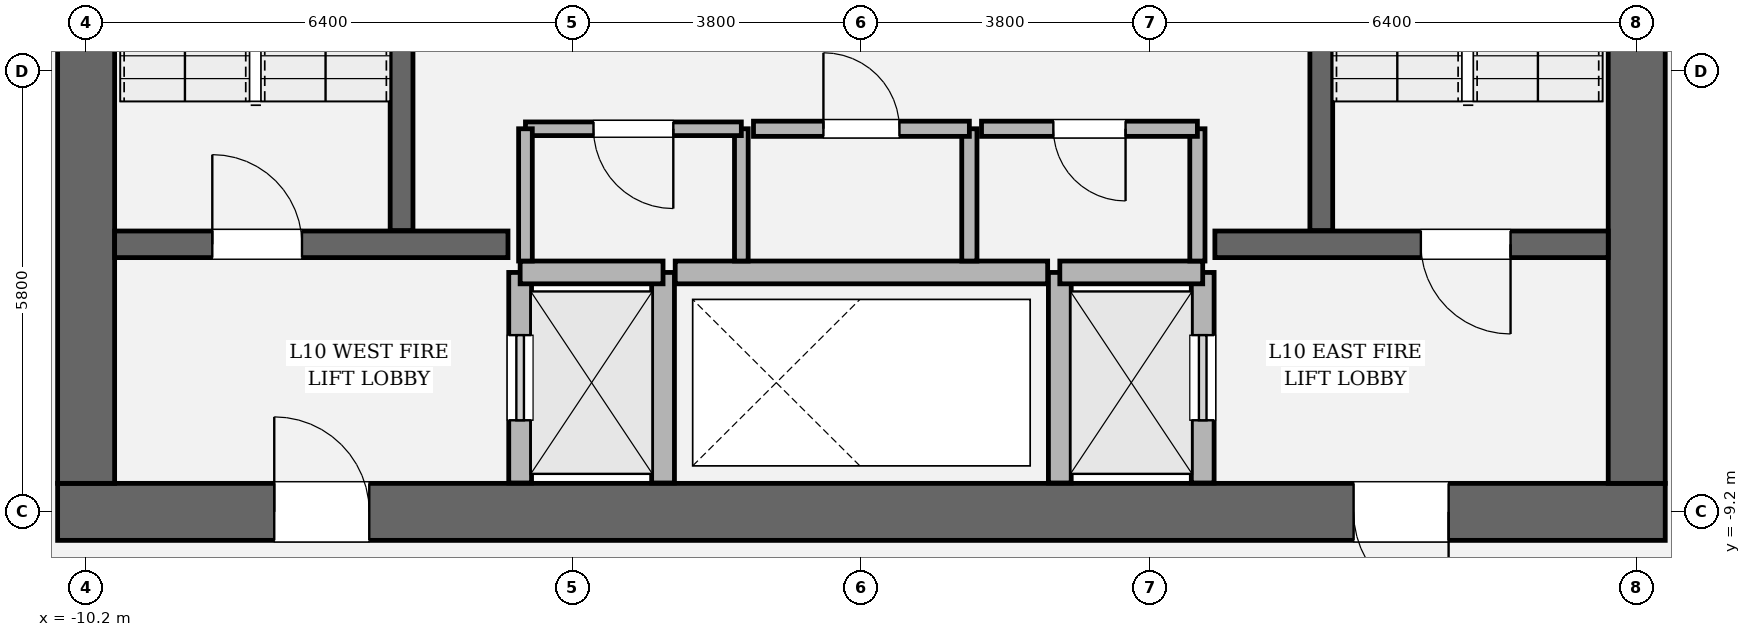
"""IFC4 building model, lengths in metres.
Left out: names, types, materials, properties, quantities, classifications, styles, units other than length and angle.
Written with IfcOpenShell. Run it as: python <this file> out.ifc"""

import sys

from ifc_helpers import new_model, si_unit, direction, frame, frame_2d, origin, place, context, subcontext, project, spatial, rectangle, extrude, element, fill, save


model = new_model("IFC4")
c1 = context("Model", 3, precision=1e-05, world=origin(), true_north=direction((0.0, 1.0)))
c2 = subcontext(c1, "Body", "Model", "MODEL_VIEW")
j1 = project(units=[si_unit("LENGTHUNIT", "METRE"), si_unit("PLANEANGLEUNIT", "RADIAN")], contexts=[c1])
p1 = place(None, origin())
s1 = spatial("IfcSite", under=j1, at=p1, CompositionType="ELEMENT")
p2 = place(p1, origin())
s2 = spatial("IfcBuilding", under=s1, at=p2, CompositionType="ELEMENT")
p3 = place(p2, frame((0.0, 0.0, 48.45)))
s3 = spatial("IfcBuildingStorey", under=s2, at=p3, CompositionType="ELEMENT", Elevation=48.45)
p4 = place(p3, frame((10.575, -9.2, 0.0), z_axis=(0.0, 0.0, 1.0), x_axis=(-1.0, 0.0, 0.0)))
e1 = element("IfcWall", 1, at=p4, inside=s3, PredefinedType="SHEAR", context=c2, shape_type="SweptSolid", body=[
    extrude(rectangle(XDim=21.15, YDim=0.75, at=frame_2d((10.575, 0.0))), origin(), (0.0, 0.0, 1.0), 4.05),
])
p5 = place(p4, frame((2.85, 0.0, 0.0)))
e2 = element("IfcOpeningElement", 2, at=p5, cuts=e1, PredefinedType="OPENING", context=c2, shape_type="SweptSolid", body=[
    extrude(rectangle(XDim=1.25, YDim=2.25, at=frame_2d((0.625, 1.125))), frame((0.0, 0.385, 0.0), z_axis=(0.0, -1.0, 0.0), x_axis=(1.0, 0.0, 0.0)), (0.0, 0.0, 1.0), 0.77),
])
p6 = place(p4, frame((17.05, 0.0, 0.0)))
e3 = element("IfcOpeningElement", 3, at=p6, cuts=e1, PredefinedType="OPENING", context=c2, shape_type="SweptSolid", body=[
    extrude(rectangle(XDim=1.25, YDim=2.25, at=frame_2d((0.625, 1.125))), frame((0.0, 0.385, 0.0), z_axis=(0.0, -1.0, 0.0), x_axis=(1.0, 0.0, 0.0)), (0.0, 0.0, 1.0), 0.77),
])
p7 = place(p3, frame((-10.2, -8.825, 0.0), z_axis=(0.0, 0.0, 1.0), x_axis=(0.0, 1.0, 0.0)))
e4 = element("IfcWall", 4, at=p7, inside=s3, PredefinedType="SHEAR", context=c2, shape_type="SweptSolid", body=[
    extrude(rectangle(XDim=17.65, YDim=0.75, at=frame_2d((8.825, 0.0))), origin(), (0.0, 0.0, 1.0), 4.05),
])
p8 = place(p7, frame((12.615, 0.0, 0.0)))
e5 = element("IfcOpeningElement", 5, at=p8, cuts=e4, PredefinedType="OPENING", context=c2, shape_type="SweptSolid", body=[
    extrude(rectangle(XDim=1.18, YDim=2.2, at=frame_2d((0.59, 1.1))), frame((0.0, 0.385, 0.0), z_axis=(0.0, -1.0, 0.0), x_axis=(1.0, 0.0, 0.0)), (0.0, 0.0, 1.0), 0.77),
])
p9 = place(p3, frame((10.2, 8.825, 0.0), z_axis=(0.0, 0.0, 1.0), x_axis=(0.0, -1.0, 0.0)))
e6 = element("IfcWall", 6, at=p9, inside=s3, PredefinedType="SHEAR", context=c2, shape_type="SweptSolid", body=[
    extrude(rectangle(XDim=17.65, YDim=0.75, at=frame_2d((8.825, 0.0))), origin(), (0.0, 0.0, 1.0), 4.05),
])
p10 = place(p9, frame((3.855, 0.0, 0.0)))
e7 = element("IfcOpeningElement", 7, at=p10, cuts=e6, PredefinedType="OPENING", context=c2, shape_type="SweptSolid", body=[
    extrude(rectangle(XDim=1.18, YDim=2.2, at=frame_2d((0.59, 1.1))), frame((0.0, 0.385, 0.0), z_axis=(0.0, -1.0, 0.0), x_axis=(1.0, 0.0, 0.0)), (0.0, 0.0, 1.0), 0.77),
])
for number, where, z_axis, x_axis in (
    (8, (-6.05, -5.5, 0.0), (0.0, 0.0, 1.0), (0.0, 1.0, 0.0)),
    (9, (6.05, 3.45, 0.0), (0.0, 0.0, 1.0), (0.0, -1.0, 0.0)),
):
    element("IfcWall", number, at=place(p3, frame(where, z_axis=z_axis, x_axis=x_axis)), inside=s3, PredefinedType="SOLIDWALL", context=c2, shape_type="SweptSolid", body=[
        extrude(rectangle(XDim=8.95, YDim=0.3, at=frame_2d((4.475, 0.0))), origin(), (0.0, 0.0, 1.0), 4.05),
    ])
p11 = place(p3, frame((-9.825, -5.68, 0.0), z_axis=(0.0, 0.0, 1.0), x_axis=(1.0, 0.0, 0.0)))
e10 = element("IfcWall", 10, at=p11, inside=s3, PredefinedType="SOLIDWALL", context=c2, shape_type="SweptSolid", body=[
    extrude(rectangle(XDim=5.175, YDim=0.35, at=frame_2d((2.587, 0.0))), origin(), (0.0, 0.0, 1.0), 4.05),
])
p12 = place(p11, frame((1.285, 0.0, 0.0)))
e11 = element("IfcOpeningElement", 11, at=p12, cuts=e10, PredefinedType="OPENING", context=c2, shape_type="SweptSolid", body=[
    extrude(rectangle(XDim=1.18, YDim=2.2, at=frame_2d((0.59, 1.1))), frame((0.0, 0.185, 0.0), z_axis=(0.0, -1.0, 0.0), x_axis=(1.0, 0.0, 0.0)), (0.0, 0.0, 1.0), 0.37),
])
p13 = place(p3, frame((4.65, -5.68, 0.0), z_axis=(0.0, 0.0, 1.0), x_axis=(1.0, 0.0, 0.0)))
e12 = element("IfcWall", 12, at=p13, inside=s3, PredefinedType="SOLIDWALL", context=c2, shape_type="SweptSolid", body=[
    extrude(rectangle(XDim=5.175, YDim=0.35, at=frame_2d((2.587, 0.0))), origin(), (0.0, 0.0, 1.0), 4.05),
])
p14 = place(p13, frame((2.71, 0.0, 0.0)))
e13 = element("IfcOpeningElement", 13, at=p14, cuts=e12, PredefinedType="OPENING", context=c2, shape_type="SweptSolid", body=[
    extrude(rectangle(XDim=1.18, YDim=2.2, at=frame_2d((0.59, 1.1))), frame((0.0, 0.185, 0.0), z_axis=(0.0, -1.0, 0.0), x_axis=(1.0, 0.0, 0.0)), (0.0, 0.0, 1.0), 0.37),
])
p15 = place(p3, frame((-4.49, -8.82, 0.0), z_axis=(0.0, 0.0, 1.0), x_axis=(0.0, 1.0, 0.0)))
e14 = element("IfcWall", 14, at=p15, inside=s3, PredefinedType="SOLIDWALL", context=c2, shape_type="SweptSolid", body=[
    extrude(rectangle(XDim=2.77, YDim=0.3, at=frame_2d((1.385, 0.0))), origin(), (0.0, 0.0, 1.0), 3.81),
])
p16 = place(p15, frame((0.825, 0.0, 0.0)))
e15 = element("IfcOpeningElement", 15, at=p16, cuts=e14, PredefinedType="OPENING", context=c2, shape_type="SweptSolid", body=[
    extrude(rectangle(XDim=1.12, YDim=2.25, at=frame_2d((0.56, 1.125))), frame((0.0, 0.16, 0.0), z_axis=(0.0, -1.0, 0.0), x_axis=(1.0, 0.0, 0.0)), (0.0, 0.0, 1.0), 0.32),
])
p17 = place(p3, frame((-2.61, -8.82, 0.0), z_axis=(0.0, 0.0, 1.0), x_axis=(0.0, 1.0, 0.0)))
e16 = element("IfcWall", 16, at=p17, inside=s3, PredefinedType="SOLIDWALL", context=c2, shape_type="SweptSolid", body=[
    extrude(rectangle(XDim=2.77, YDim=0.3, at=frame_2d((1.385, 0.0))), origin(), (0.0, 0.0, 1.0), 3.81),
])
p18 = place(p3, frame((-4.49, -6.05, 0.0), z_axis=(0.0, 0.0, 1.0), x_axis=(1.0, 0.0, 0.0)))
e17 = element("IfcWall", 17, at=p18, inside=s3, PredefinedType="SOLIDWALL", context=c2, shape_type="SweptSolid", body=[
    extrude(rectangle(XDim=1.88, YDim=0.3, at=frame_2d((0.94, 0.0))), origin(), (0.0, 0.0, 1.0), 3.81),
])
p19 = place(p3, frame((4.49, -8.82, 0.0), z_axis=(0.0, 0.0, 1.0), x_axis=(0.0, 1.0, 0.0)))
e18 = element("IfcWall", 18, at=p19, inside=s3, PredefinedType="SOLIDWALL", context=c2, shape_type="SweptSolid", body=[
    extrude(rectangle(XDim=2.77, YDim=0.3, at=frame_2d((1.385, 0.0))), origin(), (0.0, 0.0, 1.0), 3.81),
])
p20 = place(p19, frame((0.825, 0.0, 0.0)))
e19 = element("IfcOpeningElement", 19, at=p20, cuts=e18, PredefinedType="OPENING", context=c2, shape_type="SweptSolid", body=[
    extrude(rectangle(XDim=1.12, YDim=2.25, at=frame_2d((0.56, 1.125))), frame((0.0, 0.16, 0.0), z_axis=(0.0, -1.0, 0.0), x_axis=(1.0, 0.0, 0.0)), (0.0, 0.0, 1.0), 0.32),
])
p21 = place(p3, frame((2.61, -8.82, 0.0), z_axis=(0.0, 0.0, 1.0), x_axis=(0.0, 1.0, 0.0)))
e20 = element("IfcWall", 20, at=p21, inside=s3, PredefinedType="SOLIDWALL", context=c2, shape_type="SweptSolid", body=[
    extrude(rectangle(XDim=2.77, YDim=0.3, at=frame_2d((1.385, 0.0))), origin(), (0.0, 0.0, 1.0), 3.81),
])
p22 = place(p3, frame((2.61, -6.05, 0.0), z_axis=(0.0, 0.0, 1.0), x_axis=(1.0, 0.0, 0.0)))
e21 = element("IfcWall", 21, at=p22, inside=s3, PredefinedType="SOLIDWALL", context=c2, shape_type="SweptSolid", body=[
    extrude(rectangle(XDim=1.88, YDim=0.3, at=frame_2d((0.94, 0.0))), origin(), (0.0, 0.0, 1.0), 3.81),
])
p23 = place(p3, frame((-2.45, -6.05, 0.0), z_axis=(0.0, 0.0, 1.0), x_axis=(1.0, 0.0, 0.0)))
e22 = element("IfcWall", 22, at=p23, inside=s3, PredefinedType="SOLIDWALL", context=c2, shape_type="SweptSolid", body=[
    extrude(rectangle(XDim=4.9, YDim=0.3, at=frame_2d((2.45, 0.0))), origin(), (0.0, 0.0, 1.0), 3.81),
])
p24 = place(p3, frame((-1.58, -5.9, 0.0), z_axis=(0.0, 0.0, 1.0), x_axis=(0.0, 1.0, 0.0)))
e23 = element("IfcWall", 23, at=p24, inside=s3, PredefinedType="PARTITIONING", context=c2, shape_type="SweptSolid", body=[
    extrude(rectangle(XDim=1.74, YDim=0.18, at=frame_2d((0.87, 0.0))), origin(), (0.0, 0.0, 1.0), 3.81),
])
p25 = place(p3, frame((-1.58, -4.16, 0.0), z_axis=(0.0, 0.0, 1.0), x_axis=(-1.0, 0.0, 0.0)))
e24 = element("IfcWall", 24, at=p25, inside=s3, PredefinedType="PARTITIONING", context=c2, shape_type="SweptSolid", body=[
    extrude(rectangle(XDim=2.84, YDim=0.18, at=frame_2d((1.42, 0.0))), origin(), (0.0, 0.0, 1.0), 3.81),
])
p26 = place(p25, frame((0.895, 0.0, 0.0)))
e25 = element("IfcOpeningElement", 25, at=p26, cuts=e24, PredefinedType="OPENING", context=c2, shape_type="SweptSolid", body=[
    extrude(rectangle(XDim=1.05, YDim=2.2, at=frame_2d((0.525, 1.1))), frame((0.0, 0.1, 0.0), z_axis=(0.0, -1.0, 0.0), x_axis=(1.0, 0.0, 0.0)), (0.0, 0.0, 1.0), 0.2),
])
p27 = place(p3, frame((-4.42, -4.16, 0.0), z_axis=(0.0, 0.0, 1.0), x_axis=(0.0, -1.0, 0.0)))
e26 = element("IfcWall", 26, at=p27, inside=s3, PredefinedType="PARTITIONING", context=c2, shape_type="SweptSolid", body=[
    extrude(rectangle(XDim=1.74, YDim=0.18, at=frame_2d((0.87, 0.0))), origin(), (0.0, 0.0, 1.0), 3.81),
])
p28 = place(p3, frame((1.42, -5.9, 0.0), z_axis=(0.0, 0.0, 1.0), x_axis=(0.0, 1.0, 0.0)))
e27 = element("IfcWall", 27, at=p28, inside=s3, PredefinedType="SOLIDWALL", context=c2, shape_type="SweptSolid", body=[
    extrude(rectangle(XDim=1.74, YDim=0.2, at=frame_2d((0.87, 0.0))), origin(), (0.0, 0.0, 1.0), 3.81),
])
p29 = place(p3, frame((1.42, -4.16, 0.0), z_axis=(0.0, 0.0, 1.0), x_axis=(-1.0, 0.0, 0.0)))
e28 = element("IfcWall", 28, at=p29, inside=s3, PredefinedType="SOLIDWALL", context=c2, shape_type="SweptSolid", body=[
    extrude(rectangle(XDim=2.84, YDim=0.2, at=frame_2d((1.42, 0.0))), origin(), (0.0, 0.0, 1.0), 3.81),
])
p30 = place(p29, frame((0.92, 0.0, 0.0)))
e29 = element("IfcOpeningElement", 29, at=p30, cuts=e28, PredefinedType="OPENING", context=c2, shape_type="SweptSolid", body=[
    extrude(rectangle(XDim=1.0, YDim=2.15, at=frame_2d((0.5, 1.075))), frame((0.0, 0.11, 0.0), z_axis=(0.0, -1.0, 0.0), x_axis=(1.0, 0.0, 0.0)), (0.0, 0.0, 1.0), 0.22),
])
p31 = place(p3, frame((4.42, -5.9, 0.0), z_axis=(0.0, 0.0, 1.0), x_axis=(0.0, 1.0, 0.0)))
e30 = element("IfcWall", 30, at=p31, inside=s3, PredefinedType="SOLIDWALL", context=c2, shape_type="SweptSolid", body=[
    extrude(rectangle(XDim=1.74, YDim=0.2, at=frame_2d((0.87, 0.0))), origin(), (0.0, 0.0, 1.0), 3.81),
])
p32 = place(p3, frame((4.42, -4.16, 0.0), z_axis=(0.0, 0.0, 1.0), x_axis=(-1.0, 0.0, 0.0)))
e31 = element("IfcWall", 31, at=p32, inside=s3, PredefinedType="SOLIDWALL", context=c2, shape_type="SweptSolid", body=[
    extrude(rectangle(XDim=2.84, YDim=0.2, at=frame_2d((1.42, 0.0))), origin(), (0.0, 0.0, 1.0), 3.81),
])
p33 = place(p32, frame((0.945, 0.0, 0.0)))
e32 = element("IfcOpeningElement", 32, at=p33, cuts=e31, PredefinedType="OPENING", context=c2, shape_type="SweptSolid", body=[
    extrude(rectangle(XDim=0.95, YDim=2.15, at=frame_2d((0.475, 1.075))), frame((0.0, 0.11, 0.0), z_axis=(0.0, -1.0, 0.0), x_axis=(1.0, 0.0, 0.0)), (0.0, 0.0, 1.0), 0.22),
])
p34 = place(p12, origin())
e33 = element("IfcDoor", 33, at=p34, inside=s3, OperationType="SINGLE_SWING_LEFT", PredefinedType="DOOR", context=c2, shape_type="SweptSolid", body=[
    extrude(rectangle(XDim=1.18, YDim=2.2, at=frame_2d((0.59, 1.1))), frame((0.0, 0.025, 0.0), z_axis=(0.0, -1.0, 0.0), x_axis=(1.0, 0.0, 0.0)), (0.0, 0.0, 1.0), 0.05),
])
fill(e11, e33)
p35 = place(p14, origin())
e34 = element("IfcDoor", 34, at=p35, inside=s3, OperationType="SINGLE_SWING_RIGHT", PredefinedType="DOOR", context=c2, shape_type="SweptSolid", body=[
    extrude(rectangle(XDim=1.18, YDim=2.2, at=frame_2d((0.59, 1.1))), frame((0.0, 0.025, 0.0), z_axis=(0.0, -1.0, 0.0), x_axis=(1.0, 0.0, 0.0)), (0.0, 0.0, 1.0), 0.05),
])
fill(e13, e34)
p36 = place(p5, origin())
e35 = element("IfcDoor", 35, at=p36, inside=s3, OperationType="SINGLE_SWING_LEFT", PredefinedType="DOOR", context=c2, shape_type="SweptSolid", body=[
    extrude(rectangle(XDim=1.25, YDim=2.25, at=frame_2d((0.625, 1.125))), frame((0.0, 0.025, 0.0), z_axis=(0.0, -1.0, 0.0), x_axis=(1.0, 0.0, 0.0)), (0.0, 0.0, 1.0), 0.05),
])
fill(e2, e35)
p37 = place(p6, origin())
e36 = element("IfcDoor", 36, at=p37, inside=s3, OperationType="SINGLE_SWING_RIGHT", PredefinedType="DOOR", context=c2, shape_type="SweptSolid", body=[
    extrude(rectangle(XDim=1.25, YDim=2.25, at=frame_2d((0.625, 1.125))), frame((0.0, 0.025, 0.0), z_axis=(0.0, -1.0, 0.0), x_axis=(1.0, 0.0, 0.0)), (0.0, 0.0, 1.0), 0.05),
])
fill(e3, e36)
p38 = place(p16, origin())
e37 = element("IfcDoor", 37, at=p38, inside=s3, OperationType="SLIDING_TO_LEFT", PredefinedType="DOOR", context=c2, shape_type="SweptSolid", body=[
    extrude(rectangle(XDim=1.12, YDim=2.25, at=frame_2d((0.56, 1.125))), frame((0.0, 0.025, 0.0), z_axis=(0.0, -1.0, 0.0), x_axis=(1.0, 0.0, 0.0)), (0.0, 0.0, 1.0), 0.05),
])
fill(e15, e37)
p39 = place(p20, origin())
e38 = element("IfcDoor", 38, at=p39, inside=s3, OperationType="SLIDING_TO_RIGHT", PredefinedType="DOOR", context=c2, shape_type="SweptSolid", body=[
    extrude(rectangle(XDim=1.12, YDim=2.25, at=frame_2d((0.56, 1.125))), frame((0.0, 0.025, 0.0), z_axis=(0.0, -1.0, 0.0), x_axis=(1.0, 0.0, 0.0)), (0.0, 0.0, 1.0), 0.05),
])
fill(e19, e38)
p40 = place(p26, origin())
e39 = element("IfcDoor", 39, at=p40, inside=s3, OperationType="SINGLE_SWING_LEFT", PredefinedType="DOOR", context=c2, shape_type="SweptSolid", body=[
    extrude(rectangle(XDim=1.05, YDim=2.2, at=frame_2d((0.525, 1.1))), frame((0.0, 0.025, 0.0), z_axis=(0.0, -1.0, 0.0), x_axis=(1.0, 0.0, 0.0)), (0.0, 0.0, 1.0), 0.05),
])
fill(e25, e39)
p41 = place(p30, origin())
e40 = element("IfcDoor", 40, at=p41, inside=s3, OperationType="SINGLE_SWING_RIGHT", PredefinedType="DOOR", context=c2, shape_type="SweptSolid", body=[
    extrude(rectangle(XDim=1.0, YDim=2.15, at=frame_2d((0.5, 1.075))), frame((0.0, 0.025, 0.0), z_axis=(0.0, -1.0, 0.0), x_axis=(1.0, 0.0, 0.0)), (0.0, 0.0, 1.0), 0.05),
])
fill(e29, e40)
p42 = place(p33, origin())
e41 = element("IfcDoor", 41, at=p42, inside=s3, OperationType="SINGLE_SWING_LEFT", PredefinedType="DOOR", context=c2, shape_type="SweptSolid", body=[
    extrude(rectangle(XDim=0.95, YDim=2.15, at=frame_2d((0.475, 1.075))), frame((0.0, 0.025, 0.0), z_axis=(0.0, -1.0, 0.0), x_axis=(1.0, 0.0, 0.0)), (0.0, 0.0, 1.0), 0.05),
])
fill(e32, e41)
save(model, sys.argv[1])
